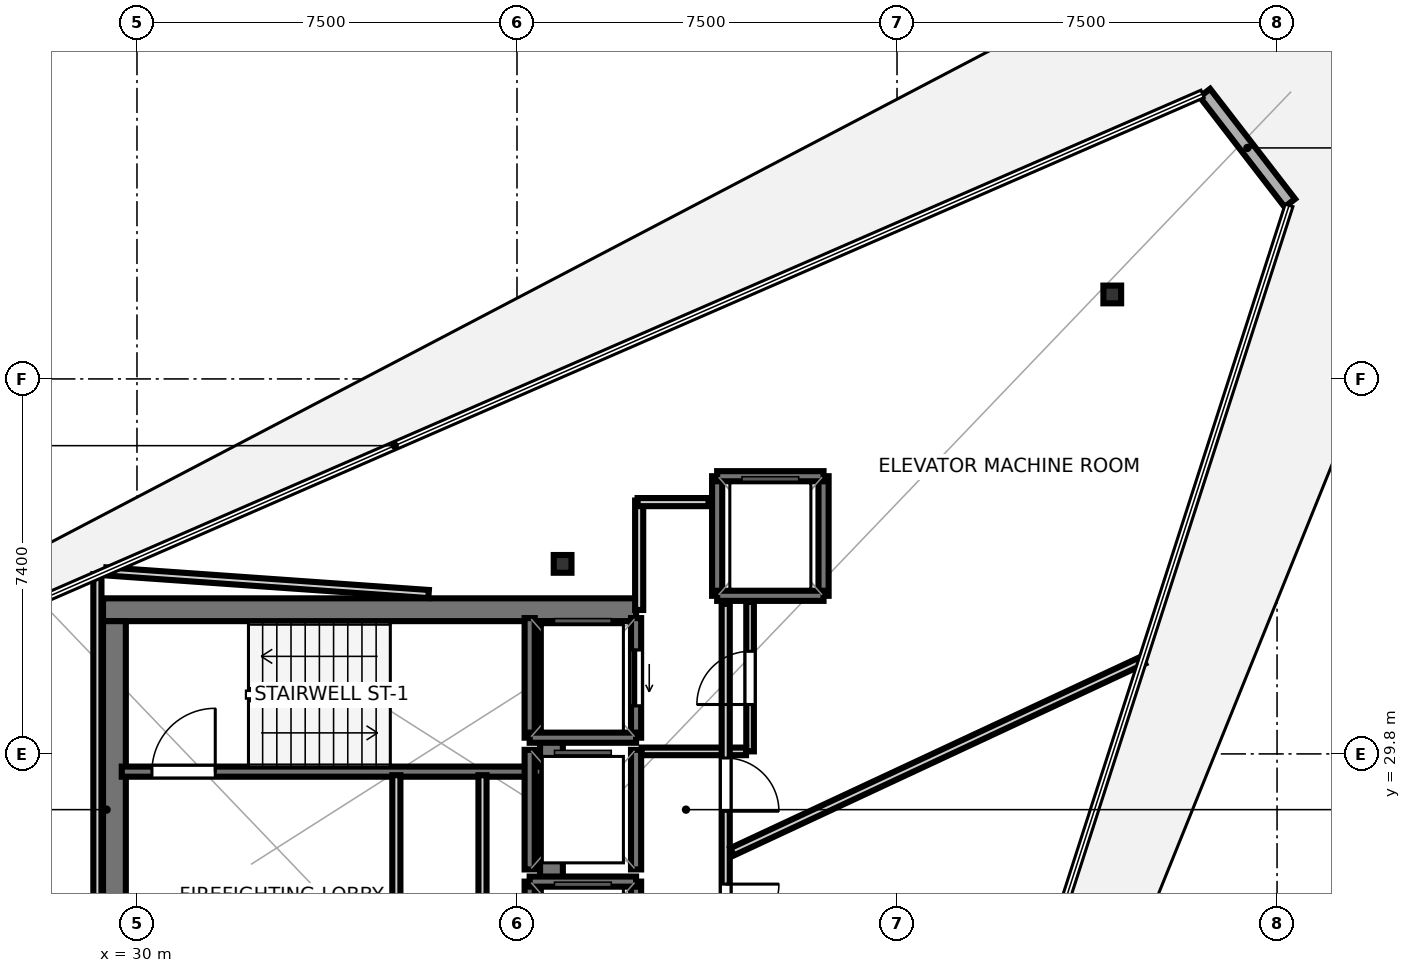
"""IFC4 building model, lengths in metres.
Left out: names, types, materials, properties, quantities, classifications, styles, units other than length and angle.
Written with IfcOpenShell. Run it as: python <this file> out.ifc"""

import sys

from ifc_helpers import new_model, si_unit, direction, frame, frame_2d, origin, origin_2d, place, context, subcontext, project, spatial, rectangle, i_section, extrude, element, fill, save


model = new_model("IFC4")
c1 = context("Model", 3, precision=1e-05, world=origin(), true_north=direction((0.0, 1.0)))
c2 = subcontext(c1, "Body", "Model", "MODEL_VIEW")
j1 = project(units=[si_unit("LENGTHUNIT", "METRE"), si_unit("PLANEANGLEUNIT", "RADIAN")], contexts=[c1])
p1 = place(None, origin())
s1 = spatial("IfcSite", under=j1, at=p1, CompositionType="ELEMENT")
p2 = place(p1, origin())
s2 = spatial("IfcBuilding", under=s1, at=p2, CompositionType="ELEMENT")
p3 = place(p2, frame((0.0, 0.0, 356.3)))
s3 = spatial("IfcBuildingStorey", under=s2, at=p3, CompositionType="ELEMENT", Elevation=356.3)
p4 = place(p3, frame((29.33, 32.645, 0.0), z_axis=(0.0, 0.0, 1.0), x_axis=(1.0, 0.0, 0.0)))
e1 = element("IfcWall", 1, at=p4, inside=s3, PredefinedType="SHEAR", context=c2, shape_type="SweptSolid", body=[
    extrude(rectangle(XDim=10.52, YDim=0.45, at=frame_2d((5.26, 0.0))), origin(), (0.0, 0.0, 1.0), 3.55),
])
for number, where, z_axis, x_axis in (
    (2, (29.555, 24.98, 0.0), (0.0, 0.0, 1.0), (0.0, 1.0, 0.0)),
    (3, (38.18, 24.98, 0.0), (0.0, 0.0, 1.0), (0.0, 1.0, 0.0)),
):
    element("IfcWall", number, at=place(p3, frame(where, z_axis=z_axis, x_axis=x_axis)), inside=s3, PredefinedType="SHEAR", context=c2, shape_type="SweptSolid", body=[
        extrude(rectangle(XDim=7.44, YDim=0.45, at=frame_2d((3.72, 0.0))), origin(), (0.0, 0.0, 1.0), 3.55),
    ])
p5 = place(p3, frame((38.4, 33.55, 0.0), z_axis=(0.0, 0.0, 1.0), x_axis=(1.0, 0.0, 0.0)))
e4 = element("IfcColumn", 4, at=p5, inside=s3, PredefinedType="COLUMN", context=c2, shape_type="SweptSolid", body=[
    extrude(i_section(OverallWidth=0.35, OverallDepth=0.35, WebThickness=0.012, FlangeThickness=0.019, at=origin_2d()), origin(), (0.0, 0.0, 1.0), 3.75),
])
p6 = place(p3, frame((49.248, 38.867, -0.25), z_axis=(0.0, 0.0, 1.0), x_axis=(1.0, 0.0, 0.0)))
e5 = element("IfcColumn", 5, at=p6, inside=s3, PredefinedType="COLUMN", context=c2, shape_type="SweptSolid", body=[
    extrude(i_section(OverallWidth=0.35, OverallDepth=0.35, WebThickness=0.012, FlangeThickness=0.019, at=origin_2d()), origin(), (0.0, 0.0, 1.0), 4.0),
])
p7 = place(p3, frame((52.753, 40.672, 0.0), z_axis=(0.0, 0.0, 1.0), x_axis=(-0.610961212473, 0.791660531322, 0.0)))
e6 = element("IfcWall", 6, at=p7, inside=s3, PredefinedType="SOLIDWALL", context=c2, shape_type="SweptSolid", body=[
    extrude(rectangle(XDim=2.744, YDim=0.26, at=frame_2d((1.372, 0.0))), origin(), (0.0, 0.0, 1.0), 3.55),
])
p8 = place(p3, frame((29.7, 29.45, 0.0), z_axis=(0.0, 0.0, 1.0), x_axis=(1.0, 0.0, 0.0)))
e7 = element("IfcWall", 7, at=p8, inside=s3, PredefinedType="SOLIDWALL", context=c2, shape_type="SweptSolid", body=[
    extrude(rectangle(XDim=8.3, YDim=0.2, at=frame_2d((4.15, 0.0))), origin(), (0.0, 0.0, 1.0), 3.55),
])
p9 = place(p8, frame((0.595, 0.0, 0.0)))
e8 = element("IfcOpeningElement", 8, at=p9, cuts=e7, PredefinedType="OPENING", context=c2, shape_type="SweptSolid", body=[
    extrude(rectangle(XDim=1.25, YDim=2.15, at=frame_2d((0.625, 1.075))), frame((0.0, 0.11, 0.0), z_axis=(0.0, -1.0, 0.0), x_axis=(1.0, 0.0, 0.0)), (0.0, 0.0, 1.0), 0.22),
])
p10 = place(p3, frame((39.85, 30.12, 0.0), z_axis=(0.0, 0.0, 1.0), x_axis=(0.0, 1.0, 0.0)))
e9 = element("IfcWall", 9, at=p10, inside=s3, PredefinedType="SOLIDWALL", context=c2, shape_type="SweptSolid", body=[
    extrude(rectangle(XDim=2.36, YDim=0.2, at=frame_2d((1.18, 0.0))), origin(), (0.0, 0.0, 1.0), 3.55),
])
p11 = place(p10, frame((0.63, 0.0, 0.0)))
e10 = element("IfcOpeningElement", 10, at=p11, cuts=e9, PredefinedType="OPENING", context=c2, shape_type="SweptSolid", body=[
    extrude(rectangle(XDim=1.1, YDim=2.15, at=frame_2d((0.55, 1.075))), frame((0.0, 0.11, 0.0), z_axis=(0.0, -1.0, 0.0), x_axis=(1.0, 0.0, 0.0)), (0.0, 0.0, 1.0), 0.22),
])
p12 = place(p3, frame((37.75, 30.12, 0.0), z_axis=(0.0, 0.0, 1.0), x_axis=(0.0, 1.0, 0.0)))
e11 = element("IfcWall", 11, at=p12, inside=s3, PredefinedType="SOLIDWALL", context=c2, shape_type="SweptSolid", body=[
    extrude(rectangle(XDim=2.36, YDim=0.2, at=frame_2d((1.18, 0.0))), origin(), (0.0, 0.0, 1.0), 3.55),
])
p13 = place(p3, frame((37.75, 30.12, 0.0), z_axis=(0.0, 0.0, 1.0), x_axis=(1.0, 0.0, 0.0)))
e12 = element("IfcWall", 12, at=p13, inside=s3, PredefinedType="SOLIDWALL", context=c2, shape_type="SweptSolid", body=[
    extrude(rectangle(XDim=2.1, YDim=0.2, at=frame_2d((1.05, 0.0))), origin(), (0.0, 0.0, 1.0), 3.55),
])
p14 = place(p3, frame((39.85, 24.92, 0.0), z_axis=(0.0, 0.0, 1.0), x_axis=(0.0, 1.0, 0.0)))
e13 = element("IfcWall", 13, at=p14, inside=s3, PredefinedType="SOLIDWALL", context=c2, shape_type="SweptSolid", body=[
    extrude(rectangle(XDim=2.36, YDim=0.2, at=frame_2d((1.18, 0.0))), origin(), (0.0, 0.0, 1.0), 3.55),
])
p15 = place(p14, frame((0.63, 0.0, 0.0)))
e14 = element("IfcOpeningElement", 14, at=p15, cuts=e13, PredefinedType="OPENING", context=c2, shape_type="SweptSolid", body=[
    extrude(rectangle(XDim=1.1, YDim=2.15, at=frame_2d((0.55, 1.075))), frame((0.0, 0.11, 0.0), z_axis=(0.0, -1.0, 0.0), x_axis=(1.0, 0.0, 0.0)), (0.0, 0.0, 1.0), 0.22),
])
p16 = place(p3, frame((37.75, 24.92, 0.0), z_axis=(0.0, 0.0, 1.0), x_axis=(0.0, 1.0, 0.0)))
e15 = element("IfcWall", 15, at=p16, inside=s3, PredefinedType="SOLIDWALL", context=c2, shape_type="SweptSolid", body=[
    extrude(rectangle(XDim=2.36, YDim=0.2, at=frame_2d((1.18, 0.0))), origin(), (0.0, 0.0, 1.0), 3.55),
])
p17 = place(p3, frame((37.75, 27.28, 0.0), z_axis=(0.0, 0.0, 1.0), x_axis=(1.0, 0.0, 0.0)))
e16 = element("IfcWall", 16, at=p17, inside=s3, PredefinedType="SOLIDWALL", context=c2, shape_type="SweptSolid", body=[
    extrude(rectangle(XDim=2.1, YDim=0.2, at=frame_2d((1.05, 0.0))), origin(), (0.0, 0.0, 1.0), 3.55),
])
for number, where, z_axis, x_axis in (
    (17, (39.85, 27.52, 0.0), (0.0, 0.0, 1.0), (0.0, 1.0, 0.0)),
    (18, (37.75, 27.52, 0.0), (0.0, 0.0, 1.0), (0.0, 1.0, 0.0)),
):
    element("IfcWall", number, at=place(p3, frame(where, z_axis=z_axis, x_axis=x_axis)), inside=s3, PredefinedType="SOLIDWALL", context=c2, shape_type="SweptSolid", body=[
        extrude(rectangle(XDim=2.36, YDim=0.2, at=frame_2d((1.18, 0.0))), origin(), (0.0, 0.0, 1.0), 3.55),
    ])
for number, where, z_axis, x_axis in (
    (19, (43.55, 32.92, 0.0), (0.0, 0.0, 1.0), (0.0, 1.0, 0.0)),
    (20, (41.45, 32.92, 0.0), (0.0, 0.0, 1.0), (0.0, 1.0, 0.0)),
):
    element("IfcWall", number, at=place(p3, frame(where, z_axis=z_axis, x_axis=x_axis)), inside=s3, PredefinedType="SOLIDWALL", context=c2, shape_type="SweptSolid", body=[
        extrude(rectangle(XDim=2.36, YDim=0.2, at=frame_2d((1.18, 0.0))), origin(), (0.0, 0.0, 1.0), 3.55),
    ])
for number, where, z_axis, x_axis in (
    (21, (41.45, 35.28, 0.0), (0.0, 0.0, 1.0), (1.0, 0.0, 0.0)),
    (22, (41.45, 32.92, 0.0), (0.0, 0.0, 1.0), (1.0, 0.0, 0.0)),
):
    element("IfcWall", number, at=place(p3, frame(where, z_axis=z_axis, x_axis=x_axis)), inside=s3, PredefinedType="SOLIDWALL", context=c2, shape_type="SweptSolid", body=[
        extrude(rectangle(XDim=2.1, YDim=0.2, at=frame_2d((1.05, 0.0))), origin(), (0.0, 0.0, 1.0), 3.55),
    ])
p18 = place(p3, frame((42.1, 29.85, 0.0), z_axis=(0.0, 0.0, 1.0), x_axis=(0.0, 1.0, 0.0)))
e23 = element("IfcWall", 23, at=p18, inside=s3, PredefinedType="PARTITIONING", context=c2, shape_type="SweptSolid", body=[
    extrude(rectangle(XDim=2.95, YDim=0.15, at=frame_2d((1.475, 0.0))), origin(), (0.0, 0.0, 1.0), 2.87),
])
p19 = place(p18, frame((0.925, 0.0, 0.0)))
e24 = element("IfcOpeningElement", 24, at=p19, cuts=e23, PredefinedType="OPENING", context=c2, shape_type="SweptSolid", body=[
    extrude(rectangle(XDim=1.05, YDim=2.15, at=frame_2d((0.525, 1.075))), frame((0.0, 0.085, 0.0), z_axis=(0.0, -1.0, 0.0), x_axis=(1.0, 0.0, 0.0)), (0.0, 0.0, 1.0), 0.17),
])
p20 = place(p3, frame((39.96, 29.85, 0.0), z_axis=(0.0, 0.0, 1.0), x_axis=(1.0, 0.0, 0.0)))
e25 = element("IfcWall", 25, at=p20, inside=s3, PredefinedType="PARTITIONING", context=c2, shape_type="SweptSolid", body=[
    extrude(rectangle(XDim=2.06, YDim=0.15, at=frame_2d((1.03, 0.0))), origin(), (0.0, 0.0, 1.0), 2.87),
])
p21 = place(p3, frame((35.119, 29.38, 0.0), z_axis=(0.0, 0.0, 1.0), x_axis=(0.0, -1.0, 0.0)))
e26 = element("IfcWall", 26, at=p21, inside=s3, PredefinedType="PARTITIONING", context=c2, shape_type="SweptSolid", body=[
    extrude(rectangle(XDim=4.96, YDim=0.16, at=frame_2d((2.48, 0.0))), origin(), (0.0, 0.0, 1.0), 2.08),
])
p22 = place(p3, frame((41.619, 32.76, 0.0), z_axis=(0.0, 0.0, 1.0), x_axis=(0.0, -1.0, 0.0)))
e27 = element("IfcWall", 27, at=p22, inside=s3, PredefinedType="PARTITIONING", context=c2, shape_type="SweptSolid", body=[
    extrude(rectangle(XDim=8.02, YDim=0.16, at=frame_2d((4.01, 0.0))), origin(), (0.0, 0.0, 1.0), 2.87),
])
p23 = place(p22, frame((5.53, 0.0, 0.0)))
e28 = element("IfcOpeningElement", 28, at=p23, cuts=e27, PredefinedType="OPENING", context=c2, shape_type="SweptSolid", body=[
    extrude(rectangle(XDim=1.05, YDim=2.15, at=frame_2d((0.525, 1.075))), frame((0.0, 0.09, 0.0), z_axis=(0.0, -1.0, 0.0), x_axis=(1.0, 0.0, 0.0)), (0.0, 0.0, 1.0), 0.18),
])
p24 = place(p22, frame((3.041, 0.0, 0.0)))
e29 = element("IfcOpeningElement", 29, at=p24, cuts=e27, PredefinedType="OPENING", context=c2, shape_type="SweptSolid", body=[
    extrude(rectangle(XDim=1.05, YDim=2.15, at=frame_2d((0.525, 1.075))), frame((0.0, 0.09, 0.0), z_axis=(0.0, -1.0, 0.0), x_axis=(1.0, 0.0, 0.0)), (0.0, 0.0, 1.0), 0.18),
])
p25 = place(p3, frame((39.911, 32.64, 0.0), z_axis=(0.0, 0.0, 1.0), x_axis=(0.0, 1.0, 0.0)))
e30 = element("IfcWall", 30, at=p25, inside=s3, PredefinedType="PARTITIONING", context=c2, shape_type="SweptSolid", body=[
    extrude(rectangle(XDim=2.16, YDim=0.16, at=frame_2d((1.08, 0.0))), origin(), (0.0, 0.0, 1.0), 2.87),
])
p26 = place(p3, frame((39.88, 34.769, 0.0), z_axis=(0.0, 0.0, 1.0), x_axis=(1.0, 0.0, 0.0)))
e31 = element("IfcWall", 31, at=p26, inside=s3, PredefinedType="PARTITIONING", context=c2, shape_type="SweptSolid", body=[
    extrude(rectangle(XDim=1.4, YDim=0.16, at=frame_2d((0.7, 0.0))), origin(), (0.0, 0.0, 1.0), 2.87),
])
p27 = place(p3, frame((36.819, 29.38, 0.0), z_axis=(0.0, 0.0, 1.0), x_axis=(0.0, -1.0, 0.0)))
e32 = element("IfcWall", 32, at=p27, inside=s3, PredefinedType="PARTITIONING", context=c2, shape_type="SweptSolid", body=[
    extrude(rectangle(XDim=4.96, YDim=0.16, at=frame_2d((2.48, 0.0))), origin(), (0.0, 0.0, 1.0), 2.87),
])
p28 = place(p3, frame((29.219, 33.348, 0.0), z_axis=(0.0, 0.0, 1.0), x_axis=(0.0, -1.0, 0.0)))
e33 = element("IfcWall", 33, at=p28, inside=s3, PredefinedType="PARTITIONING", context=c2, shape_type="SweptSolid", body=[
    extrude(rectangle(XDim=8.993, YDim=0.16, at=frame_2d((4.497, 0.0))), origin(), (0.0, 0.0, 1.0), 2.87),
])
p29 = place(p3, frame((41.743, 27.867, 0.0), z_axis=(0.0, 0.0, 1.0), x_axis=(0.906309072271, 0.422615505535, 0.0)))
e34 = element("IfcWall", 34, at=p29, inside=s3, PredefinedType="PARTITIONING", context=c2, shape_type="SweptSolid", body=[
    extrude(rectangle(XDim=8.962, YDim=0.16, at=frame_2d((4.481, 0.0))), origin(), (0.0, 0.0, 1.0), 2.87),
])
p30 = place(p3, frame((35.756, 32.955, 0.0), z_axis=(0.0, 0.0, 1.0), x_axis=(-0.997543619883, 0.070048029454, 0.0)))
e35 = element("IfcWall", 35, at=p30, inside=s3, PredefinedType="PARTITIONING", context=c2, shape_type="SweptSolid", body=[
    extrude(rectangle(XDim=6.382, YDim=0.16, at=frame_2d((3.191, 0.0))), origin(), (0.0, 0.0, 1.0), 2.87),
])
p31 = place(p9, origin())
e36 = element("IfcDoor", 36, at=p31, inside=s3, OperationType="SINGLE_SWING_RIGHT", PredefinedType="DOOR", context=c2, shape_type="SweptSolid", body=[
    extrude(rectangle(XDim=1.25, YDim=2.15, at=frame_2d((0.625, 1.075))), frame((0.0, 0.025, 0.0), z_axis=(0.0, -1.0, 0.0), x_axis=(1.0, 0.0, 0.0)), (0.0, 0.0, 1.0), 0.05),
])
fill(e8, e36)
p32 = place(p11, origin())
e37 = element("IfcDoor", 37, at=p32, inside=s3, OperationType="SLIDING_TO_LEFT", PredefinedType="DOOR", context=c2, shape_type="SweptSolid", body=[
    extrude(rectangle(XDim=1.1, YDim=2.15, at=frame_2d((0.55, 1.075))), frame((0.0, 0.025, 0.0), z_axis=(0.0, -1.0, 0.0), x_axis=(1.0, 0.0, 0.0)), (0.0, 0.0, 1.0), 0.05),
])
fill(e10, e37)
p33 = place(p19, origin())
e38 = element("IfcDoor", 38, at=p33, inside=s3, OperationType="SINGLE_SWING_LEFT", PredefinedType="DOOR", context=c2, shape_type="SweptSolid", body=[
    extrude(rectangle(XDim=1.05, YDim=2.15, at=frame_2d((0.525, 1.075))), frame((0.0, 0.025, 0.0), z_axis=(0.0, -1.0, 0.0), x_axis=(1.0, 0.0, 0.0)), (0.0, 0.0, 1.0), 0.05),
])
fill(e24, e38)
p34 = place(p23, origin())
e39 = element("IfcDoor", 39, at=p34, inside=s3, OperationType="SINGLE_SWING_LEFT", PredefinedType="DOOR", context=c2, shape_type="SweptSolid", body=[
    extrude(rectangle(XDim=1.05, YDim=2.15, at=frame_2d((0.525, 1.075))), frame((0.0, 0.025, 0.0), z_axis=(0.0, -1.0, 0.0), x_axis=(1.0, 0.0, 0.0)), (0.0, 0.0, 1.0), 0.05),
])
fill(e28, e39)
p35 = place(p24, origin())
e40 = element("IfcDoor", 40, at=p35, inside=s3, OperationType="SINGLE_SWING_RIGHT", PredefinedType="DOOR", context=c2, shape_type="SweptSolid", body=[
    extrude(rectangle(XDim=1.05, YDim=2.15, at=frame_2d((0.525, 1.075))), frame((0.0, 0.025, 0.0), z_axis=(0.0, -1.0, 0.0), x_axis=(1.0, 0.0, 0.0)), (0.0, 0.0, 1.0), 0.05),
])
fill(e29, e40)
save(model, sys.argv[1])
